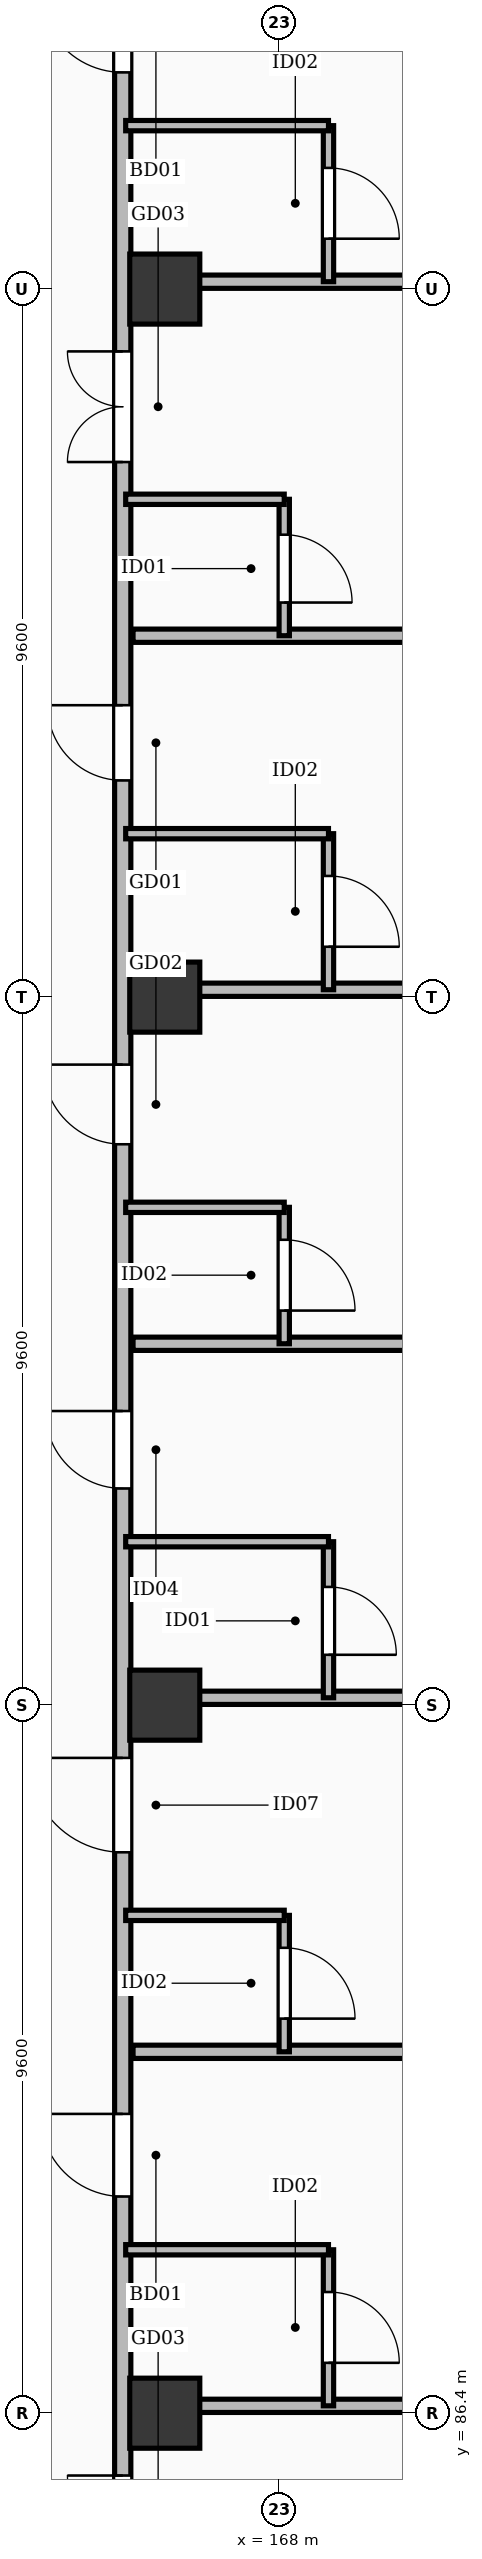
"""IFC4 building model, lengths in metres.
Left out: names, types, materials, properties, quantities, classifications, styles, units other than length and angle.
Written with IfcOpenShell. Run it as: python <this file> out.ifc"""

import sys

from ifc_helpers import new_model, si_unit, direction, frame, frame_2d, origin, origin_2d, place, context, subcontext, project, spatial, rectangle, extrude, element, fill, save


model = new_model("IFC4")
c1 = context("Model", 3, precision=1e-05, world=origin(), true_north=direction((0.0, 1.0)))
c2 = subcontext(c1, "Body", "Model", "MODEL_VIEW")
j1 = project(units=[si_unit("LENGTHUNIT", "METRE"), si_unit("PLANEANGLEUNIT", "RADIAN")], contexts=[c1])
p1 = place(None, origin())
s1 = spatial("IfcSite", under=j1, at=p1, CompositionType="ELEMENT")
p2 = place(p1, origin())
s2 = spatial("IfcBuilding", under=s1, at=p2, CompositionType="ELEMENT")
p3 = place(p2, frame((0.0, 0.0, 11.4)))
s3 = spatial("IfcBuildingStorey", under=s2, at=p3, CompositionType="ELEMENT", Elevation=11.4)
for number, where, z_axis, x_axis in (
    (1, (166.45, 86.4, 0.0), (0.0, 0.0, 1.0), (1.0, 0.0, 0.0)),
    (2, (166.45, 96.0, 0.0), (0.0, 0.0, 1.0), (1.0, 0.0, 0.0)),
    (3, (166.45, 105.6, 0.0), (0.0, 0.0, 1.0), (1.0, 0.0, 0.0)),
    (4, (166.45, 115.2, 0.0), (0.0, 0.0, 1.0), (1.0, 0.0, 0.0)),
):
    element("IfcColumn", number, at=place(p3, frame(where, z_axis=z_axis, x_axis=x_axis)), inside=s3, PredefinedType="COLUMN", context=c2, shape_type="SweptSolid", body=[
        extrude(rectangle(XDim=0.95, YDim=0.95, at=origin_2d()), origin(), (0.0, 0.0, 1.0), 4.8),
    ])
p4 = place(p3, frame((165.88, 65.4, 0.0), z_axis=(0.0, 0.0, 1.0), x_axis=(0.0, 1.0, 0.0)))
e5 = element("IfcWall", 5, at=p4, inside=s3, PredefinedType="PARTITIONING", context=c2, shape_type="SweptSolid", body=[
    extrude(rectangle(XDim=60.25, YDim=0.22, at=frame_2d((30.125, 0.0))), origin(), (0.0, 0.0, 1.0), 3.662),
])
p5 = place(p4, frame((4.738, 0.0, 0.0)))
e6 = element("IfcOpeningElement", 6, at=p5, cuts=e5, PredefinedType="OPENING", context=c2, shape_type="SweptSolid", body=[
    extrude(rectangle(XDim=1.05, YDim=2.18, at=frame_2d((0.525, 1.09))), frame((0.0, 0.122, 0.0), z_axis=(0.0, -1.0, 0.0), x_axis=(1.0, 0.0, 0.0)), (0.0, 0.0, 1.0), 0.244),
])
p6 = place(p4, frame((9.405, 0.0, 0.0)))
e7 = element("IfcOpeningElement", 7, at=p6, cuts=e5, PredefinedType="OPENING", context=c2, shape_type="SweptSolid", body=[
    extrude(rectangle(XDim=1.08, YDim=2.25, at=frame_2d((0.54, 1.125))), frame((0.0, 0.122, 0.0), z_axis=(0.0, -1.0, 0.0), x_axis=(1.0, 0.0, 0.0)), (0.0, 0.0, 1.0), 0.244),
])
p7 = place(p4, frame((14.338, 0.0, 0.0)))
e8 = element("IfcOpeningElement", 8, at=p7, cuts=e5, PredefinedType="OPENING", context=c2, shape_type="SweptSolid", body=[
    extrude(rectangle(XDim=1.02, YDim=2.2, at=frame_2d((0.51, 1.1))), frame((0.0, 0.122, 0.0), z_axis=(0.0, -1.0, 0.0), x_axis=(1.0, 0.0, 0.0)), (0.0, 0.0, 1.0), 0.244),
])
p8 = place(p4, frame((18.655, 0.0, 0.0)))
e9 = element("IfcOpeningElement", 9, at=p8, cuts=e5, PredefinedType="OPENING", context=c2, shape_type="SweptSolid", body=[
    extrude(rectangle(XDim=1.5, YDim=2.3, at=frame_2d((0.75, 1.15))), frame((0.0, 0.122, 0.0), z_axis=(0.0, -1.0, 0.0), x_axis=(1.0, 0.0, 0.0)), (0.0, 0.0, 1.0), 0.244),
])
p9 = place(p4, frame((23.938, 0.0, 0.0)))
e10 = element("IfcOpeningElement", 10, at=p9, cuts=e5, PredefinedType="OPENING", context=c2, shape_type="SweptSolid", body=[
    extrude(rectangle(XDim=1.12, YDim=2.15, at=frame_2d((0.56, 1.075))), frame((0.0, 0.122, 0.0), z_axis=(0.0, -1.0, 0.0), x_axis=(1.0, 0.0, 0.0)), (0.0, 0.0, 1.0), 0.244),
])
p10 = place(p4, frame((28.605, 0.0, 0.0)))
e11 = element("IfcOpeningElement", 11, at=p10, cuts=e5, PredefinedType="OPENING", context=c2, shape_type="SweptSolid", body=[
    extrude(rectangle(XDim=1.28, YDim=2.16, at=frame_2d((0.64, 1.08))), frame((0.0, 0.122, 0.0), z_axis=(0.0, -1.0, 0.0), x_axis=(1.0, 0.0, 0.0)), (0.0, 0.0, 1.0), 0.244),
])
p11 = place(p4, frame((33.538, 0.0, 0.0)))
e12 = element("IfcOpeningElement", 12, at=p11, cuts=e5, PredefinedType="OPENING", context=c2, shape_type="SweptSolid", body=[
    extrude(rectangle(XDim=1.05, YDim=2.18, at=frame_2d((0.525, 1.09))), frame((0.0, 0.122, 0.0), z_axis=(0.0, -1.0, 0.0), x_axis=(1.0, 0.0, 0.0)), (0.0, 0.0, 1.0), 0.244),
])
p12 = place(p4, frame((38.205, 0.0, 0.0)))
e13 = element("IfcOpeningElement", 13, at=p12, cuts=e5, PredefinedType="OPENING", context=c2, shape_type="SweptSolid", body=[
    extrude(rectangle(XDim=1.08, YDim=2.25, at=frame_2d((0.54, 1.125))), frame((0.0, 0.122, 0.0), z_axis=(0.0, -1.0, 0.0), x_axis=(1.0, 0.0, 0.0)), (0.0, 0.0, 1.0), 0.244),
])
p13 = place(p4, frame((43.138, 0.0, 0.0)))
e14 = element("IfcOpeningElement", 14, at=p13, cuts=e5, PredefinedType="OPENING", context=c2, shape_type="SweptSolid", body=[
    extrude(rectangle(XDim=1.02, YDim=2.2, at=frame_2d((0.51, 1.1))), frame((0.0, 0.122, 0.0), z_axis=(0.0, -1.0, 0.0), x_axis=(1.0, 0.0, 0.0)), (0.0, 0.0, 1.0), 0.244),
])
p14 = place(p4, frame((47.455, 0.0, 0.0)))
e15 = element("IfcOpeningElement", 15, at=p14, cuts=e5, PredefinedType="OPENING", context=c2, shape_type="SweptSolid", body=[
    extrude(rectangle(XDim=1.5, YDim=2.3, at=frame_2d((0.75, 1.15))), frame((0.0, 0.122, 0.0), z_axis=(0.0, -1.0, 0.0), x_axis=(1.0, 0.0, 0.0)), (0.0, 0.0, 1.0), 0.244),
])
p15 = place(p4, frame((52.738, 0.0, 0.0)))
e16 = element("IfcOpeningElement", 16, at=p15, cuts=e5, PredefinedType="OPENING", context=c2, shape_type="SweptSolid", body=[
    extrude(rectangle(XDim=1.12, YDim=2.15, at=frame_2d((0.56, 1.075))), frame((0.0, 0.122, 0.0), z_axis=(0.0, -1.0, 0.0), x_axis=(1.0, 0.0, 0.0)), (0.0, 0.0, 1.0), 0.244),
])
p16 = place(p4, frame((57.405, 0.0, 0.0)))
e17 = element("IfcOpeningElement", 17, at=p16, cuts=e5, PredefinedType="OPENING", context=c2, shape_type="SweptSolid", body=[
    extrude(rectangle(XDim=1.28, YDim=2.16, at=frame_2d((0.64, 1.08))), frame((0.0, 0.122, 0.0), z_axis=(0.0, -1.0, 0.0), x_axis=(1.0, 0.0, 0.0)), (0.0, 0.0, 1.0), 0.244),
])
p17 = place(p3, frame((166.02, 86.5, 0.0), z_axis=(0.0, 0.0, 1.0), x_axis=(1.0, 0.0, 0.0)))
e18 = element("IfcWall", 18, at=p17, inside=s3, PredefinedType="PARTITIONING", context=c2, shape_type="SweptSolid", body=[
    extrude(rectangle(XDim=13.23, YDim=0.18, at=frame_2d((6.615, 0.0))), origin(), (0.0, 0.0, 1.0), 3.662),
])
p18 = place(p3, frame((168.67, 86.5, 0.0), z_axis=(0.0, 0.0, 1.0), x_axis=(0.0, 1.0, 0.0)))
e19 = element("IfcWall", 19, at=p18, inside=s3, PredefinedType="PARTITIONING", context=c2, shape_type="SweptSolid", body=[
    extrude(rectangle(XDim=2.116, YDim=0.14, at=frame_2d((1.058, 0.0))), origin(), (0.0, 0.0, 1.0), 3.692),
])
p19 = place(p18, frame((0.583, 0.0, 0.0)))
e20 = element("IfcOpeningElement", 20, at=p19, cuts=e19, PredefinedType="OPENING", context=c2, shape_type="SweptSolid", body=[
    extrude(rectangle(XDim=0.96, YDim=2.12, at=frame_2d((0.48, 1.06))), frame((0.0, 0.082, 0.0), z_axis=(0.0, -1.0, 0.0), x_axis=(1.0, 0.0, 0.0)), (0.0, 0.0, 1.0), 0.164),
])
p20 = place(p3, frame((165.92, 88.616, 0.0), z_axis=(0.0, 0.0, 1.0), x_axis=(1.0, 0.0, 0.0)))
e21 = element("IfcWall", 21, at=p20, inside=s3, PredefinedType="PARTITIONING", context=c2, shape_type="SweptSolid", body=[
    extrude(rectangle(XDim=2.75, YDim=0.14, at=frame_2d((1.375, 0.0))), origin(), (0.0, 0.0, 1.0), 3.692),
])
p21 = place(p3, frame((166.02, 91.3, 0.0), z_axis=(0.0, 0.0, 1.0), x_axis=(1.0, 0.0, 0.0)))
e22 = element("IfcWall", 22, at=p21, inside=s3, PredefinedType="PARTITIONING", context=c2, shape_type="SweptSolid", body=[
    extrude(rectangle(XDim=13.23, YDim=0.18, at=frame_2d((6.615, 0.0))), origin(), (0.0, 0.0, 1.0), 3.662),
])
p22 = place(p3, frame((168.07, 91.3, 0.0), z_axis=(0.0, 0.0, 1.0), x_axis=(0.0, 1.0, 0.0)))
e23 = element("IfcWall", 23, at=p22, inside=s3, PredefinedType="PARTITIONING", context=c2, shape_type="SweptSolid", body=[
    extrude(rectangle(XDim=1.85, YDim=0.14, at=frame_2d((0.925, 0.0))), origin(), (0.0, 0.0, 1.0), 4.42),
])
p23 = place(p22, frame((0.45, 0.0, 0.0)))
e24 = element("IfcOpeningElement", 24, at=p23, cuts=e23, PredefinedType="OPENING", context=c2, shape_type="SweptSolid", body=[
    extrude(rectangle(XDim=0.96, YDim=2.12, at=frame_2d((0.48, 1.06))), frame((0.0, 0.082, 0.0), z_axis=(0.0, -1.0, 0.0), x_axis=(1.0, 0.0, 0.0)), (0.0, 0.0, 1.0), 0.164),
])
p24 = place(p3, frame((165.92, 93.15, 0.0), z_axis=(0.0, 0.0, 1.0), x_axis=(1.0, 0.0, 0.0)))
e25 = element("IfcWall", 25, at=p24, inside=s3, PredefinedType="PARTITIONING", context=c2, shape_type="SweptSolid", body=[
    extrude(rectangle(XDim=2.15, YDim=0.14, at=frame_2d((1.075, 0.0))), origin(), (0.0, 0.0, 1.0), 3.692),
])
p25 = place(p3, frame((166.02, 96.1, 0.0), z_axis=(0.0, 0.0, 1.0), x_axis=(1.0, 0.0, 0.0)))
e26 = element("IfcWall", 26, at=p25, inside=s3, PredefinedType="PARTITIONING", context=c2, shape_type="SweptSolid", body=[
    extrude(rectangle(XDim=13.23, YDim=0.18, at=frame_2d((6.615, 0.0))), origin(), (0.0, 0.0, 1.0), 3.662),
])
p26 = place(p3, frame((168.67, 96.1, 0.0), z_axis=(0.0, 0.0, 1.0), x_axis=(0.0, 1.0, 0.0)))
e27 = element("IfcWall", 27, at=p26, inside=s3, PredefinedType="PARTITIONING", context=c2, shape_type="SweptSolid", body=[
    extrude(rectangle(XDim=2.116, YDim=0.14, at=frame_2d((1.058, 0.0))), origin(), (0.0, 0.0, 1.0), 3.692),
])
p27 = place(p26, frame((0.583, 0.0, 0.0)))
e28 = element("IfcOpeningElement", 28, at=p27, cuts=e27, PredefinedType="OPENING", context=c2, shape_type="SweptSolid", body=[
    extrude(rectangle(XDim=0.92, YDim=2.1, at=frame_2d((0.46, 1.05))), frame((0.0, 0.082, 0.0), z_axis=(0.0, -1.0, 0.0), x_axis=(1.0, 0.0, 0.0)), (0.0, 0.0, 1.0), 0.164),
])
p28 = place(p3, frame((165.92, 98.216, 0.0), z_axis=(0.0, 0.0, 1.0), x_axis=(1.0, 0.0, 0.0)))
e29 = element("IfcWall", 29, at=p28, inside=s3, PredefinedType="PARTITIONING", context=c2, shape_type="SweptSolid", body=[
    extrude(rectangle(XDim=2.75, YDim=0.14, at=frame_2d((1.375, 0.0))), origin(), (0.0, 0.0, 1.0), 3.692),
])
p29 = place(p3, frame((166.02, 100.9, 0.0), z_axis=(0.0, 0.0, 1.0), x_axis=(1.0, 0.0, 0.0)))
e30 = element("IfcWall", 30, at=p29, inside=s3, PredefinedType="PARTITIONING", context=c2, shape_type="SweptSolid", body=[
    extrude(rectangle(XDim=13.23, YDim=0.18, at=frame_2d((6.615, 0.0))), origin(), (0.0, 0.0, 1.0), 3.662),
])
p30 = place(p3, frame((168.07, 100.9, 0.0), z_axis=(0.0, 0.0, 1.0), x_axis=(0.0, 1.0, 0.0)))
e31 = element("IfcWall", 31, at=p30, inside=s3, PredefinedType="PARTITIONING", context=c2, shape_type="SweptSolid", body=[
    extrude(rectangle(XDim=1.85, YDim=0.14, at=frame_2d((0.925, 0.0))), origin(), (0.0, 0.0, 1.0), 4.42),
])
p31 = place(p30, frame((0.45, 0.0, 0.0)))
e32 = element("IfcOpeningElement", 32, at=p31, cuts=e31, PredefinedType="OPENING", context=c2, shape_type="SweptSolid", body=[
    extrude(rectangle(XDim=0.96, YDim=2.12, at=frame_2d((0.48, 1.06))), frame((0.0, 0.082, 0.0), z_axis=(0.0, -1.0, 0.0), x_axis=(1.0, 0.0, 0.0)), (0.0, 0.0, 1.0), 0.164),
])
p32 = place(p3, frame((165.92, 102.75, 0.0), z_axis=(0.0, 0.0, 1.0), x_axis=(1.0, 0.0, 0.0)))
e33 = element("IfcWall", 33, at=p32, inside=s3, PredefinedType="PARTITIONING", context=c2, shape_type="SweptSolid", body=[
    extrude(rectangle(XDim=2.15, YDim=0.14, at=frame_2d((1.075, 0.0))), origin(), (0.0, 0.0, 1.0), 3.692),
])
p33 = place(p3, frame((166.02, 105.7, 0.0), z_axis=(0.0, 0.0, 1.0), x_axis=(1.0, 0.0, 0.0)))
e34 = element("IfcWall", 34, at=p33, inside=s3, PredefinedType="PARTITIONING", context=c2, shape_type="SweptSolid", body=[
    extrude(rectangle(XDim=13.23, YDim=0.18, at=frame_2d((6.615, 0.0))), origin(), (0.0, 0.0, 1.0), 3.662),
])
p34 = place(p3, frame((168.67, 105.7, 0.0), z_axis=(0.0, 0.0, 1.0), x_axis=(0.0, 1.0, 0.0)))
e35 = element("IfcWall", 35, at=p34, inside=s3, PredefinedType="PARTITIONING", context=c2, shape_type="SweptSolid", body=[
    extrude(rectangle(XDim=2.116, YDim=0.14, at=frame_2d((1.058, 0.0))), origin(), (0.0, 0.0, 1.0), 3.692),
])
p35 = place(p34, frame((0.583, 0.0, 0.0)))
e36 = element("IfcOpeningElement", 36, at=p35, cuts=e35, PredefinedType="OPENING", context=c2, shape_type="SweptSolid", body=[
    extrude(rectangle(XDim=0.96, YDim=2.12, at=frame_2d((0.48, 1.06))), frame((0.0, 0.082, 0.0), z_axis=(0.0, -1.0, 0.0), x_axis=(1.0, 0.0, 0.0)), (0.0, 0.0, 1.0), 0.164),
])
p36 = place(p3, frame((165.92, 107.816, 0.0), z_axis=(0.0, 0.0, 1.0), x_axis=(1.0, 0.0, 0.0)))
e37 = element("IfcWall", 37, at=p36, inside=s3, PredefinedType="PARTITIONING", context=c2, shape_type="SweptSolid", body=[
    extrude(rectangle(XDim=2.75, YDim=0.14, at=frame_2d((1.375, 0.0))), origin(), (0.0, 0.0, 1.0), 3.692),
])
p37 = place(p3, frame((166.02, 110.5, 0.0), z_axis=(0.0, 0.0, 1.0), x_axis=(1.0, 0.0, 0.0)))
e38 = element("IfcWall", 38, at=p37, inside=s3, PredefinedType="PARTITIONING", context=c2, shape_type="SweptSolid", body=[
    extrude(rectangle(XDim=13.23, YDim=0.18, at=frame_2d((6.615, 0.0))), origin(), (0.0, 0.0, 1.0), 3.662),
])
p38 = place(p3, frame((168.07, 110.5, 0.0), z_axis=(0.0, 0.0, 1.0), x_axis=(0.0, 1.0, 0.0)))
e39 = element("IfcWall", 39, at=p38, inside=s3, PredefinedType="PARTITIONING", context=c2, shape_type="SweptSolid", body=[
    extrude(rectangle(XDim=1.85, YDim=0.14, at=frame_2d((0.925, 0.0))), origin(), (0.0, 0.0, 1.0), 4.42),
])
p39 = place(p38, frame((0.45, 0.0, 0.0)))
e40 = element("IfcOpeningElement", 40, at=p39, cuts=e39, PredefinedType="OPENING", context=c2, shape_type="SweptSolid", body=[
    extrude(rectangle(XDim=0.92, YDim=2.1, at=frame_2d((0.46, 1.05))), frame((0.0, 0.082, 0.0), z_axis=(0.0, -1.0, 0.0), x_axis=(1.0, 0.0, 0.0)), (0.0, 0.0, 1.0), 0.164),
])
p40 = place(p3, frame((165.92, 112.35, 0.0), z_axis=(0.0, 0.0, 1.0), x_axis=(1.0, 0.0, 0.0)))
e41 = element("IfcWall", 41, at=p40, inside=s3, PredefinedType="PARTITIONING", context=c2, shape_type="SweptSolid", body=[
    extrude(rectangle(XDim=2.15, YDim=0.14, at=frame_2d((1.075, 0.0))), origin(), (0.0, 0.0, 1.0), 3.692),
])
p41 = place(p3, frame((166.02, 115.3, 0.0), z_axis=(0.0, 0.0, 1.0), x_axis=(1.0, 0.0, 0.0)))
e42 = element("IfcWall", 42, at=p41, inside=s3, PredefinedType="PARTITIONING", context=c2, shape_type="SweptSolid", body=[
    extrude(rectangle(XDim=13.23, YDim=0.18, at=frame_2d((6.615, 0.0))), origin(), (0.0, 0.0, 1.0), 3.662),
])
p42 = place(p3, frame((168.67, 115.3, 0.0), z_axis=(0.0, 0.0, 1.0), x_axis=(0.0, 1.0, 0.0)))
e43 = element("IfcWall", 43, at=p42, inside=s3, PredefinedType="PARTITIONING", context=c2, shape_type="SweptSolid", body=[
    extrude(rectangle(XDim=2.116, YDim=0.14, at=frame_2d((1.058, 0.0))), origin(), (0.0, 0.0, 1.0), 3.692),
])
p43 = place(p42, frame((0.583, 0.0, 0.0)))
e44 = element("IfcOpeningElement", 44, at=p43, cuts=e43, PredefinedType="OPENING", context=c2, shape_type="SweptSolid", body=[
    extrude(rectangle(XDim=0.96, YDim=2.12, at=frame_2d((0.48, 1.06))), frame((0.0, 0.082, 0.0), z_axis=(0.0, -1.0, 0.0), x_axis=(1.0, 0.0, 0.0)), (0.0, 0.0, 1.0), 0.164),
])
p44 = place(p3, frame((165.92, 117.416, 0.0), z_axis=(0.0, 0.0, 1.0), x_axis=(1.0, 0.0, 0.0)))
e45 = element("IfcWall", 45, at=p44, inside=s3, PredefinedType="PARTITIONING", context=c2, shape_type="SweptSolid", body=[
    extrude(rectangle(XDim=2.75, YDim=0.14, at=frame_2d((1.375, 0.0))), origin(), (0.0, 0.0, 1.0), 3.692),
])
p45 = place(p8, origin())
e46 = element("IfcDoor", 46, at=p45, inside=s3, OperationType="DOUBLE_DOOR_SINGLE_SWING", PredefinedType="DOOR", context=c2, shape_type="SweptSolid", body=[
    extrude(rectangle(XDim=1.5, YDim=2.3, at=frame_2d((0.75, 1.15))), frame((0.0, 0.025, 0.0), z_axis=(0.0, -1.0, 0.0), x_axis=(1.0, 0.0, 0.0)), (0.0, 0.0, 1.0), 0.05),
])
fill(e9, e46)
p46 = place(p9, origin())
e47 = element("IfcDoor", 47, at=p46, inside=s3, OperationType="SINGLE_SWING_RIGHT", PredefinedType="DOOR", context=c2, shape_type="SweptSolid", body=[
    extrude(rectangle(XDim=1.12, YDim=2.15, at=frame_2d((0.56, 1.075))), frame((0.0, 0.025, 0.0), z_axis=(0.0, -1.0, 0.0), x_axis=(1.0, 0.0, 0.0)), (0.0, 0.0, 1.0), 0.05),
])
fill(e10, e47)
p47 = place(p19, frame((0.96, 0.0, 0.0), z_axis=(0.0, 0.0, 1.0), x_axis=(-1.0, 0.0, 0.0)))
e48 = element("IfcDoor", 48, at=p47, inside=s3, OperationType="SINGLE_SWING_LEFT", PredefinedType="DOOR", context=c2, shape_type="SweptSolid", body=[
    extrude(rectangle(XDim=0.96, YDim=2.12, at=frame_2d((0.48, 1.06))), frame((0.0, 0.025, 0.0), z_axis=(0.0, -1.0, 0.0), x_axis=(1.0, 0.0, 0.0)), (0.0, 0.0, 1.0), 0.05),
])
fill(e20, e48)
p48 = place(p10, origin())
e49 = element("IfcDoor", 49, at=p48, inside=s3, OperationType="SINGLE_SWING_RIGHT", PredefinedType="DOOR", context=c2, shape_type="SweptSolid", body=[
    extrude(rectangle(XDim=1.28, YDim=2.16, at=frame_2d((0.64, 1.08))), frame((0.0, 0.025, 0.0), z_axis=(0.0, -1.0, 0.0), x_axis=(1.0, 0.0, 0.0)), (0.0, 0.0, 1.0), 0.05),
])
fill(e11, e49)
p49 = place(p23, frame((0.96, 0.0, 0.0), z_axis=(0.0, 0.0, 1.0), x_axis=(-1.0, 0.0, 0.0)))
e50 = element("IfcDoor", 50, at=p49, inside=s3, OperationType="SINGLE_SWING_LEFT", PredefinedType="DOOR", context=c2, shape_type="SweptSolid", body=[
    extrude(rectangle(XDim=0.96, YDim=2.12, at=frame_2d((0.48, 1.06))), frame((0.0, 0.025, 0.0), z_axis=(0.0, -1.0, 0.0), x_axis=(1.0, 0.0, 0.0)), (0.0, 0.0, 1.0), 0.05),
])
fill(e24, e50)
p50 = place(p11, origin())
e51 = element("IfcDoor", 51, at=p50, inside=s3, OperationType="SINGLE_SWING_RIGHT", PredefinedType="DOOR", context=c2, shape_type="SweptSolid", body=[
    extrude(rectangle(XDim=1.05, YDim=2.18, at=frame_2d((0.525, 1.09))), frame((0.0, 0.025, 0.0), z_axis=(0.0, -1.0, 0.0), x_axis=(1.0, 0.0, 0.0)), (0.0, 0.0, 1.0), 0.05),
])
fill(e12, e51)
p51 = place(p27, frame((0.92, 0.0, 0.0), z_axis=(0.0, 0.0, 1.0), x_axis=(-1.0, 0.0, 0.0)))
e52 = element("IfcDoor", 52, at=p51, inside=s3, OperationType="SINGLE_SWING_LEFT", PredefinedType="DOOR", context=c2, shape_type="SweptSolid", body=[
    extrude(rectangle(XDim=0.92, YDim=2.1, at=frame_2d((0.46, 1.05))), frame((0.0, 0.025, 0.0), z_axis=(0.0, -1.0, 0.0), x_axis=(1.0, 0.0, 0.0)), (0.0, 0.0, 1.0), 0.05),
])
fill(e28, e52)
p52 = place(p12, origin())
e53 = element("IfcDoor", 53, at=p52, inside=s3, OperationType="SINGLE_SWING_RIGHT", PredefinedType="DOOR", context=c2, shape_type="SweptSolid", body=[
    extrude(rectangle(XDim=1.08, YDim=2.25, at=frame_2d((0.54, 1.125))), frame((0.0, 0.025, 0.0), z_axis=(0.0, -1.0, 0.0), x_axis=(1.0, 0.0, 0.0)), (0.0, 0.0, 1.0), 0.05),
])
fill(e13, e53)
p53 = place(p31, frame((0.96, 0.0, 0.0), z_axis=(0.0, 0.0, 1.0), x_axis=(-1.0, 0.0, 0.0)))
e54 = element("IfcDoor", 54, at=p53, inside=s3, OperationType="SINGLE_SWING_LEFT", PredefinedType="DOOR", context=c2, shape_type="SweptSolid", body=[
    extrude(rectangle(XDim=0.96, YDim=2.12, at=frame_2d((0.48, 1.06))), frame((0.0, 0.025, 0.0), z_axis=(0.0, -1.0, 0.0), x_axis=(1.0, 0.0, 0.0)), (0.0, 0.0, 1.0), 0.05),
])
fill(e32, e54)
p54 = place(p13, origin())
e55 = element("IfcDoor", 55, at=p54, inside=s3, OperationType="SINGLE_SWING_RIGHT", PredefinedType="DOOR", context=c2, shape_type="SweptSolid", body=[
    extrude(rectangle(XDim=1.02, YDim=2.2, at=frame_2d((0.51, 1.1))), frame((0.0, 0.025, 0.0), z_axis=(0.0, -1.0, 0.0), x_axis=(1.0, 0.0, 0.0)), (0.0, 0.0, 1.0), 0.05),
])
fill(e14, e55)
p55 = place(p35, frame((0.96, 0.0, 0.0), z_axis=(0.0, 0.0, 1.0), x_axis=(-1.0, 0.0, 0.0)))
e56 = element("IfcDoor", 56, at=p55, inside=s3, OperationType="SINGLE_SWING_LEFT", PredefinedType="DOOR", context=c2, shape_type="SweptSolid", body=[
    extrude(rectangle(XDim=0.96, YDim=2.12, at=frame_2d((0.48, 1.06))), frame((0.0, 0.025, 0.0), z_axis=(0.0, -1.0, 0.0), x_axis=(1.0, 0.0, 0.0)), (0.0, 0.0, 1.0), 0.05),
])
fill(e36, e56)
p56 = place(p14, origin())
e57 = element("IfcDoor", 57, at=p56, inside=s3, OperationType="DOUBLE_DOOR_SINGLE_SWING", PredefinedType="DOOR", context=c2, shape_type="SweptSolid", body=[
    extrude(rectangle(XDim=1.5, YDim=2.3, at=frame_2d((0.75, 1.15))), frame((0.0, 0.025, 0.0), z_axis=(0.0, -1.0, 0.0), x_axis=(1.0, 0.0, 0.0)), (0.0, 0.0, 1.0), 0.05),
])
fill(e15, e57)
p57 = place(p39, frame((0.92, 0.0, 0.0), z_axis=(0.0, 0.0, 1.0), x_axis=(-1.0, 0.0, 0.0)))
e58 = element("IfcDoor", 58, at=p57, inside=s3, OperationType="SINGLE_SWING_LEFT", PredefinedType="DOOR", context=c2, shape_type="SweptSolid", body=[
    extrude(rectangle(XDim=0.92, YDim=2.1, at=frame_2d((0.46, 1.05))), frame((0.0, 0.025, 0.0), z_axis=(0.0, -1.0, 0.0), x_axis=(1.0, 0.0, 0.0)), (0.0, 0.0, 1.0), 0.05),
])
fill(e40, e58)
p58 = place(p15, origin())
e59 = element("IfcDoor", 59, at=p58, inside=s3, OperationType="SINGLE_SWING_RIGHT", PredefinedType="DOOR", context=c2, shape_type="SweptSolid", body=[
    extrude(rectangle(XDim=1.12, YDim=2.15, at=frame_2d((0.56, 1.075))), frame((0.0, 0.025, 0.0), z_axis=(0.0, -1.0, 0.0), x_axis=(1.0, 0.0, 0.0)), (0.0, 0.0, 1.0), 0.05),
])
fill(e16, e59)
p59 = place(p43, frame((0.96, 0.0, 0.0), z_axis=(0.0, 0.0, 1.0), x_axis=(-1.0, 0.0, 0.0)))
e60 = element("IfcDoor", 60, at=p59, inside=s3, OperationType="SINGLE_SWING_LEFT", PredefinedType="DOOR", context=c2, shape_type="SweptSolid", body=[
    extrude(rectangle(XDim=0.96, YDim=2.12, at=frame_2d((0.48, 1.06))), frame((0.0, 0.025, 0.0), z_axis=(0.0, -1.0, 0.0), x_axis=(1.0, 0.0, 0.0)), (0.0, 0.0, 1.0), 0.05),
])
fill(e44, e60)
save(model, sys.argv[1])
